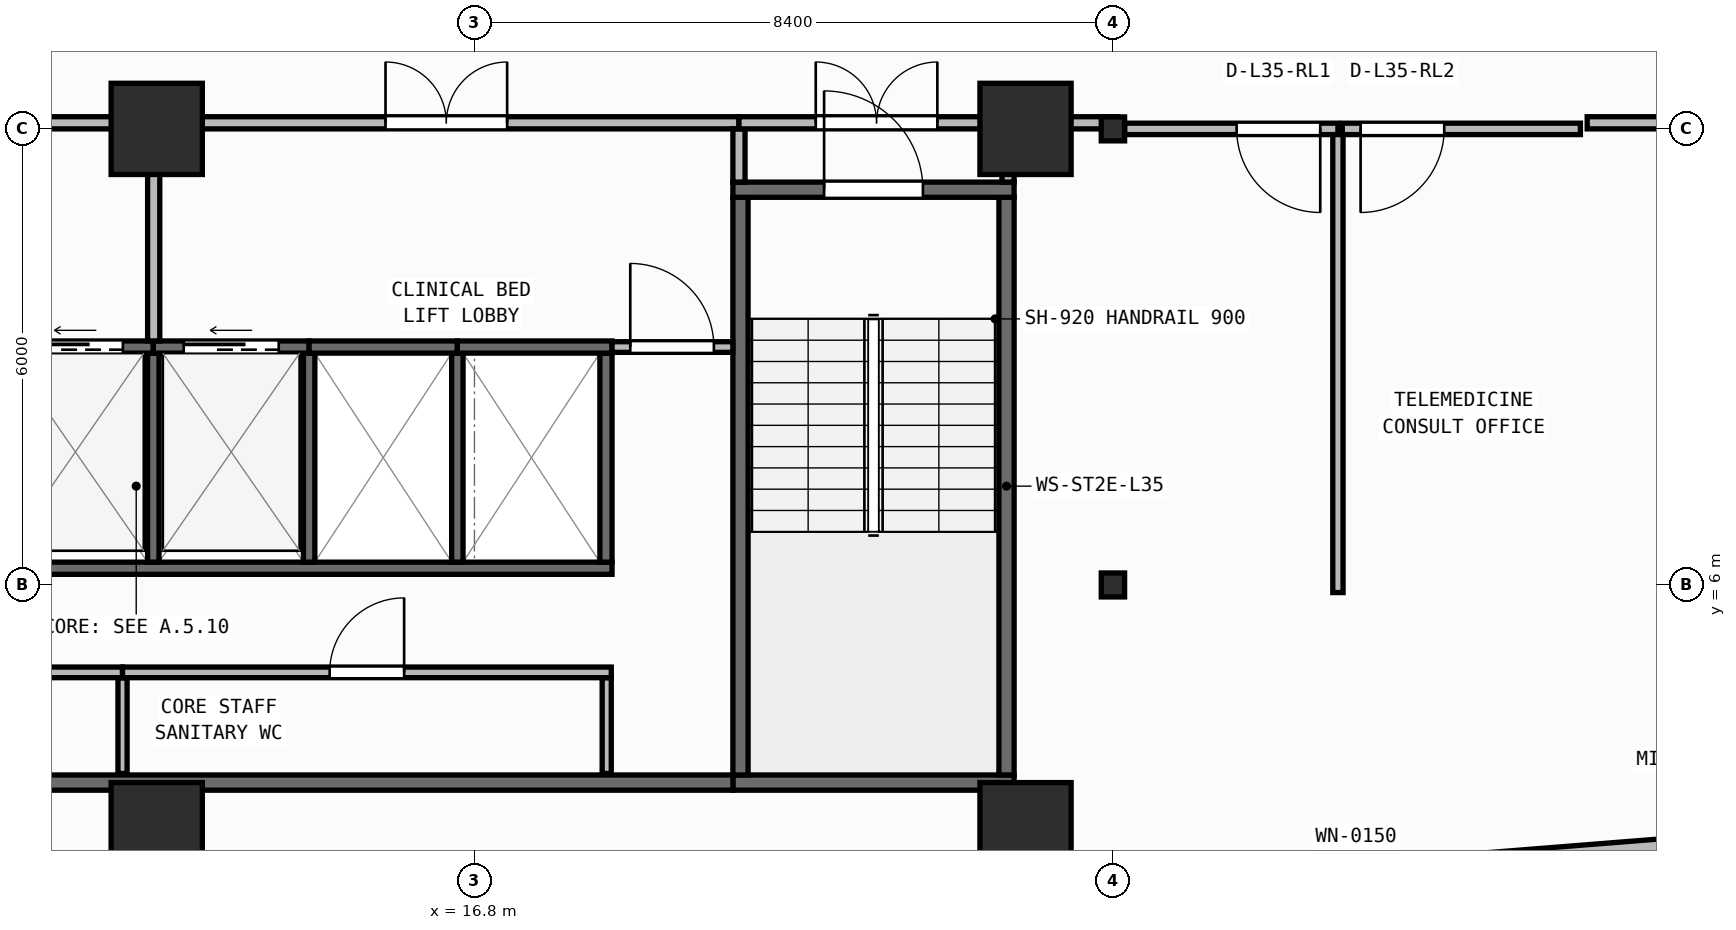
"""IFC4 building model, lengths in metres.
Left out: names, types, materials, properties, quantities, classifications, styles, units other than length and angle.
Written with IfcOpenShell. Run it as: python <this file> out.ifc"""

import sys

from ifc_helpers import new_model, si_unit, direction, frame, frame_2d, origin, origin_2d, place, context, subcontext, project, spatial, rectangle, i_section, extrude, element, fill, save


model = new_model("IFC4")
c1 = context("Model", 3, precision=1e-05, world=origin(), true_north=direction((0.0, 1.0)))
c2 = subcontext(c1, "Body", "Model", "MODEL_VIEW")
j1 = project(units=[si_unit("LENGTHUNIT", "METRE"), si_unit("PLANEANGLEUNIT", "RADIAN")], contexts=[c1])
p1 = place(None, origin())
s1 = spatial("IfcSite", under=j1, at=p1, CompositionType="ELEMENT")
p2 = place(p1, origin())
s2 = spatial("IfcBuilding", under=s1, at=p2, CompositionType="ELEMENT")
p3 = place(p2, frame((0.0, 0.0, 142.85)))
s3 = spatial("IfcBuildingStorey", under=s2, at=p3, CompositionType="ELEMENT", Elevation=142.85)
for number, where, z_axis, x_axis in (
    (1, (12.62, 2.8, 0.0), (0.0, 0.0, 1.0), (1.0, 0.0, 0.0)),
    (2, (24.05, 2.8, 0.0), (0.0, 0.0, 1.0), (1.0, 0.0, 0.0)),
):
    element("IfcColumn", number, at=place(p3, frame(where, z_axis=z_axis, x_axis=x_axis)), inside=s3, PredefinedType="COLUMN", context=c2, shape_type="SweptSolid", body=[
        extrude(rectangle(XDim=1.2, YDim=1.2, at=origin_2d()), origin(), (0.0, 0.0, 1.0), 3.95),
    ])
p4 = place(p3, frame((25.2, 6.0, 0.0), z_axis=(0.0, 0.0, 1.0), x_axis=(1.0, 0.0, 0.0)))
e3 = element("IfcColumn", 3, at=p4, inside=s3, PredefinedType="COLUMN", context=c2, shape_type="SweptSolid", body=[
    extrude(i_section(OverallWidth=0.307, OverallDepth=0.315, WebThickness=0.012, FlangeThickness=0.019, FilletRadius=0.017, at=origin_2d()), origin(), (0.0, 0.0, 1.0), 3.95),
])
for number, where, z_axis, x_axis in (
    (4, (12.62, 12.0, 0.0), (0.0, 0.0, 1.0), (1.0, 0.0, 0.0)),
    (5, (24.05, 12.0, 0.0), (0.0, 0.0, 1.0), (1.0, 0.0, 0.0)),
):
    element("IfcColumn", number, at=place(p3, frame(where, z_axis=z_axis, x_axis=x_axis)), inside=s3, PredefinedType="COLUMN", context=c2, shape_type="SweptSolid", body=[
        extrude(rectangle(XDim=1.2, YDim=1.2, at=origin_2d()), origin(), (0.0, 0.0, 1.0), 3.95),
    ])
p5 = place(p3, frame((25.2, 12.0, 0.0), z_axis=(0.0, 0.0, 1.0), x_axis=(1.0, 0.0, 0.0)))
e6 = element("IfcColumn", 6, at=p5, inside=s3, PredefinedType="COLUMN", context=c2, shape_type="SweptSolid", body=[
    extrude(i_section(OverallWidth=0.307, OverallDepth=0.315, WebThickness=0.012, FlangeThickness=0.019, FilletRadius=0.017, at=origin_2d()), origin(), (0.0, 0.0, 1.0), 3.95),
])
p6 = place(p3, frame((2.76, 0.173, 0.0), z_axis=(0.0, 0.0, 1.0), x_axis=(0.996857931723, 0.079210251617, 0.0)))
e7 = element("IfcWall", 7, at=p6, inside=s3, PredefinedType="STANDARD", context=c2, shape_type="SweptSolid", body=[
    extrude(rectangle(XDim=51.442, YDim=0.26, at=frame_2d((25.721, 0.0))), origin(), (0.0, 0.0, 1.0), 3.71),
])
p7 = place(p6, frame((24.521, 0.0, 0.9)))
e8 = element("IfcOpeningElement", 8, at=p7, cuts=e7, PredefinedType="OPENING", context=c2, shape_type="SweptSolid", body=[
    extrude(rectangle(XDim=2.4, YDim=1.65, at=frame_2d((1.2, 0.825))), frame((0.0, 0.14, 0.0), z_axis=(0.0, -1.0, 0.0), x_axis=(1.0, 0.0, 0.0)), (0.0, 0.0, 1.0), 0.28),
])
p8 = place(p3, frame((20.2, 3.4, 0.0), z_axis=(0.0, 0.0, 1.0), x_axis=(1.0, 0.0, 0.0)))
e9 = element("IfcWall", 9, at=p8, inside=s3, PredefinedType="SHEAR", context=c2, shape_type="SweptSolid", body=[
    extrude(rectangle(XDim=3.7, YDim=0.2, at=frame_2d((1.85, 0.0))), origin(), (0.0, 0.0, 1.0), 3.71),
])
for number, where, z_axis, x_axis in (
    (10, (20.3, 3.5, 0.0), (0.0, 0.0, 1.0), (0.0, 1.0, 0.0)),
    (11, (23.8, 3.5, 0.0), (0.0, 0.0, 1.0), (0.0, 1.0, 0.0)),
):
    element("IfcWall", number, at=place(p3, frame(where, z_axis=z_axis, x_axis=x_axis)), inside=s3, PredefinedType="SHEAR", context=c2, shape_type="SweptSolid", body=[
        extrude(rectangle(XDim=7.6, YDim=0.2, at=frame_2d((3.8, 0.0))), origin(), (0.0, 0.0, 1.0), 3.71),
    ])
p9 = place(p3, frame((20.2, 11.2, 0.0), z_axis=(0.0, 0.0, 1.0), x_axis=(1.0, 0.0, 0.0)))
e12 = element("IfcWall", 12, at=p9, inside=s3, PredefinedType="SHEAR", context=c2, shape_type="SweptSolid", body=[
    extrude(rectangle(XDim=3.7, YDim=0.2, at=frame_2d((1.85, 0.0))), origin(), (0.0, 0.0, 1.0), 3.71),
])
p10 = place(p9, frame((1.2, 0.0, 0.0)))
e13 = element("IfcOpeningElement", 13, at=p10, cuts=e12, PredefinedType="OPENING", context=c2, shape_type="SweptSolid", body=[
    extrude(rectangle(XDim=1.3, YDim=2.15, at=frame_2d((0.65, 1.075))), frame((0.0, 0.11, 0.0), z_axis=(0.0, -1.0, 0.0), x_axis=(1.0, 0.0, 0.0)), (0.0, 0.0, 1.0), 0.22),
])
p11 = place(p3, frame((6.5, 3.4, 0.0), z_axis=(0.0, 0.0, 1.0), x_axis=(1.0, 0.0, 0.0)))
e14 = element("IfcWall", 14, at=p11, inside=s3, PredefinedType="SHEAR", context=c2, shape_type="SweptSolid", body=[
    extrude(rectangle(XDim=13.7, YDim=0.2, at=frame_2d((6.85, 0.0))), origin(), (0.0, 0.0, 1.0), 3.71),
])
p12 = place(p3, frame((6.5, 6.22, 0.0), z_axis=(0.0, 0.0, 1.0), x_axis=(1.0, 0.0, 0.0)))
e15 = element("IfcWall", 15, at=p12, inside=s3, PredefinedType="SHEAR", context=c2, shape_type="SweptSolid", body=[
    extrude(rectangle(XDim=12.11, YDim=0.16, at=frame_2d((6.055, 0.0))), origin(), (0.0, 0.0, 1.0), 3.71),
])
p13 = place(p3, frame((18.53, 6.3, 0.0), z_axis=(0.0, 0.0, 1.0), x_axis=(0.0, 1.0, 0.0)))
e16 = element("IfcWall", 16, at=p13, inside=s3, PredefinedType="SHEAR", context=c2, shape_type="SweptSolid", body=[
    extrude(rectangle(XDim=2.75, YDim=0.16, at=frame_2d((1.375, 0.0))), origin(), (0.0, 0.0, 1.0), 3.71),
])
for number, where, z_axis, x_axis in (
    (17, (12.575, 6.3, 0.0), (0.0, 0.0, 1.0), (0.0, 1.0, 0.0)),
    (18, (14.625, 6.3, 0.0), (0.0, 0.0, 1.0), (0.0, 1.0, 0.0)),
    (19, (16.575, 6.3, 0.0), (0.0, 0.0, 1.0), (0.0, 1.0, 0.0)),
):
    element("IfcWall", number, at=place(p3, frame(where, z_axis=z_axis, x_axis=x_axis)), inside=s3, PredefinedType="SHEAR", context=c2, shape_type="SweptSolid", body=[
        extrude(rectangle(XDim=2.75, YDim=0.15, at=frame_2d((1.375, 0.0))), origin(), (0.0, 0.0, 1.0), 3.71),
    ])
p14 = place(p3, frame((10.525, 9.13, 0.0), z_axis=(0.0, 0.0, 1.0), x_axis=(1.0, 0.0, 0.0)))
e20 = element("IfcWall", 20, at=p14, inside=s3, PredefinedType="SHEAR", context=c2, shape_type="SweptSolid", body=[
    extrude(rectangle(XDim=2.05, YDim=0.16, at=frame_2d((1.025, 0.0))), origin(), (0.0, 0.0, 1.0), 3.71),
])
p15 = place(p14, frame((0.4, 0.0, 0.0)))
e21 = element("IfcOpeningElement", 21, at=p15, cuts=e20, PredefinedType="OPENING", context=c2, shape_type="SweptSolid", body=[
    extrude(rectangle(XDim=1.25, YDim=2.15, at=frame_2d((0.625, 1.075))), frame((0.0, 0.09, 0.0), z_axis=(0.0, -1.0, 0.0), x_axis=(1.0, 0.0, 0.0)), (0.0, 0.0, 1.0), 0.18),
])
p16 = place(p3, frame((12.575, 9.13, 0.0), z_axis=(0.0, 0.0, 1.0), x_axis=(1.0, 0.0, 0.0)))
e22 = element("IfcWall", 22, at=p16, inside=s3, PredefinedType="SHEAR", context=c2, shape_type="SweptSolid", body=[
    extrude(rectangle(XDim=2.05, YDim=0.16, at=frame_2d((1.025, 0.0))), origin(), (0.0, 0.0, 1.0), 3.71),
])
p17 = place(p16, frame((0.4, 0.0, 0.0)))
e23 = element("IfcOpeningElement", 23, at=p17, cuts=e22, PredefinedType="OPENING", context=c2, shape_type="SweptSolid", body=[
    extrude(rectangle(XDim=1.25, YDim=2.15, at=frame_2d((0.625, 1.075))), frame((0.0, 0.09, 0.0), z_axis=(0.0, -1.0, 0.0), x_axis=(1.0, 0.0, 0.0)), (0.0, 0.0, 1.0), 0.18),
])
p18 = place(p3, frame((14.625, 9.13, 0.0), z_axis=(0.0, 0.0, 1.0), x_axis=(1.0, 0.0, 0.0)))
e24 = element("IfcWall", 24, at=p18, inside=s3, PredefinedType="SHEAR", context=c2, shape_type="SweptSolid", body=[
    extrude(rectangle(XDim=1.95, YDim=0.16, at=frame_2d((0.975, 0.0))), origin(), (0.0, 0.0, 1.0), 3.71),
])
p19 = place(p3, frame((16.575, 9.13, 0.0), z_axis=(0.0, 0.0, 1.0), x_axis=(1.0, 0.0, 0.0)))
e25 = element("IfcWall", 25, at=p19, inside=s3, PredefinedType="SHEAR", context=c2, shape_type="SweptSolid", body=[
    extrude(rectangle(XDim=2.035, YDim=0.16, at=frame_2d((1.018, 0.0))), origin(), (0.0, 0.0, 1.0), 3.71),
])
for number, where, z_axis, x_axis in (
    (26, (12.17, 3.52, 0.0), (0.0, 0.0, 1.0), (0.0, 1.0, 0.0)),
    (27, (18.54, 3.52, 0.0), (0.0, 0.0, 1.0), (0.0, 1.0, 0.0)),
):
    element("IfcWall", number, at=place(p3, frame(where, z_axis=z_axis, x_axis=x_axis)), inside=s3, PredefinedType="PARTITIONING", context=c2, shape_type="SweptSolid", body=[
        extrude(rectangle(XDim=1.26, YDim=0.12, at=frame_2d((0.63, 0.0))), origin(), (0.0, 0.0, 1.0), 3.71),
    ])
p20 = place(p3, frame((6.5, 4.85, 0.0), z_axis=(0.0, 0.0, 1.0), x_axis=(1.0, 0.0, 0.0)))
e28 = element("IfcWall", 28, at=p20, inside=s3, PredefinedType="PARTITIONING", context=c2, shape_type="SweptSolid", body=[
    extrude(rectangle(XDim=5.67, YDim=0.14, at=frame_2d((2.835, 0.0))), origin(), (0.0, 0.0, 1.0), 3.71),
])
p21 = place(p20, frame((2.285, 0.0, 0.0)))
e29 = element("IfcOpeningElement", 29, at=p21, cuts=e28, PredefinedType="OPENING", context=c2, shape_type="SweptSolid", body=[
    extrude(rectangle(XDim=1.1, YDim=2.1, at=frame_2d((0.55, 1.05))), frame((0.0, 0.08, 0.0), z_axis=(0.0, -1.0, 0.0), x_axis=(1.0, 0.0, 0.0)), (0.0, 0.0, 1.0), 0.16),
])
p22 = place(p3, frame((12.17, 4.85, 0.0), z_axis=(0.0, 0.0, 1.0), x_axis=(1.0, 0.0, 0.0)))
e30 = element("IfcWall", 30, at=p22, inside=s3, PredefinedType="PARTITIONING", context=c2, shape_type="SweptSolid", body=[
    extrude(rectangle(XDim=6.43, YDim=0.14, at=frame_2d((3.215, 0.0))), origin(), (0.0, 0.0, 1.0), 3.71),
])
p23 = place(p22, frame((2.725, 0.0, 0.0)))
e31 = element("IfcOpeningElement", 31, at=p23, cuts=e30, PredefinedType="OPENING", context=c2, shape_type="SweptSolid", body=[
    extrude(rectangle(XDim=0.98, YDim=2.1, at=frame_2d((0.49, 1.05))), frame((0.0, 0.08, 0.0), z_axis=(0.0, -1.0, 0.0), x_axis=(1.0, 0.0, 0.0)), (0.0, 0.0, 1.0), 0.16),
])
p24 = place(p3, frame((18.61, 9.13, 0.0), z_axis=(0.0, 0.0, 1.0), x_axis=(1.0, 0.0, 0.0)))
e32 = element("IfcWall", 32, at=p24, inside=s3, PredefinedType="PARTITIONING", context=c2, shape_type="SweptSolid", body=[
    extrude(rectangle(XDim=1.59, YDim=0.14, at=frame_2d((0.795, 0.0))), origin(), (0.0, 0.0, 1.0), 3.71),
])
p25 = place(p24, frame((0.24, 0.0, 0.0)))
e33 = element("IfcOpeningElement", 33, at=p25, cuts=e32, PredefinedType="OPENING", context=c2, shape_type="SweptSolid", body=[
    extrude(rectangle(XDim=1.1, YDim=2.1, at=frame_2d((0.55, 1.05))), frame((0.0, 0.08, 0.0), z_axis=(0.0, -1.0, 0.0), x_axis=(1.0, 0.0, 0.0)), (0.0, 0.0, 1.0), 0.16),
])
p26 = place(p3, frame((6.4, 12.08, 0.0), z_axis=(0.0, 0.0, 1.0), x_axis=(1.0, 0.0, 0.0)))
e34 = element("IfcWall", 34, at=p26, inside=s3, PredefinedType="PARTITIONING", context=c2, shape_type="SweptSolid", body=[
    extrude(rectangle(XDim=6.18, YDim=0.16, at=frame_2d((3.09, 0.0))), origin(), (0.0, 0.0, 1.0), 3.083),
])
p27 = place(p26, frame((2.29, 0.0, 0.0)))
e35 = element("IfcOpeningElement", 35, at=p27, cuts=e34, PredefinedType="OPENING", context=c2, shape_type="SweptSolid", body=[
    extrude(rectangle(XDim=1.6, YDim=2.05, at=frame_2d((0.8, 1.025))), frame((0.0, 0.09, 0.0), z_axis=(0.0, -1.0, 0.0), x_axis=(1.0, 0.0, 0.0)), (0.0, 0.0, 1.0), 0.18),
])
p28 = place(p3, frame((12.58, 9.21, 0.0), z_axis=(0.0, 0.0, 1.0), x_axis=(0.0, 1.0, 0.0)))
e36 = element("IfcWall", 36, at=p28, inside=s3, PredefinedType="PARTITIONING", context=c2, shape_type="SweptSolid", body=[
    extrude(rectangle(XDim=2.79, YDim=0.16, at=frame_2d((1.395, 0.0))), origin(), (0.0, 0.0, 1.0), 3.71),
])
p29 = place(p3, frame((12.58, 12.08, 0.0), z_axis=(0.0, 0.0, 1.0), x_axis=(1.0, 0.0, 0.0)))
e37 = element("IfcWall", 37, at=p29, inside=s3, PredefinedType="PARTITIONING", context=c2, shape_type="SweptSolid", body=[
    extrude(rectangle(XDim=7.7, YDim=0.16, at=frame_2d((3.85, 0.0))), origin(), (0.0, 0.0, 1.0), 3.083),
])
p30 = place(p29, frame((3.05, 0.0, 0.0)))
e38 = element("IfcOpeningElement", 38, at=p30, cuts=e37, PredefinedType="OPENING", context=c2, shape_type="SweptSolid", body=[
    extrude(rectangle(XDim=1.6, YDim=2.05, at=frame_2d((0.8, 1.025))), frame((0.0, 0.09, 0.0), z_axis=(0.0, -1.0, 0.0), x_axis=(1.0, 0.0, 0.0)), (0.0, 0.0, 1.0), 0.18),
])
p31 = place(p3, frame((20.28, 11.3, 0.0), z_axis=(0.0, 0.0, 1.0), x_axis=(0.0, 1.0, 0.0)))
e39 = element("IfcWall", 39, at=p31, inside=s3, PredefinedType="PARTITIONING", context=c2, shape_type="SweptSolid", body=[
    extrude(rectangle(XDim=0.7, YDim=0.16, at=frame_2d((0.35, 0.0))), origin(), (0.0, 0.0, 1.0), 3.71),
])
p32 = place(p3, frame((20.28, 12.08, 0.0), z_axis=(0.0, 0.0, 1.0), x_axis=(1.0, 0.0, 0.0)))
e40 = element("IfcWall", 40, at=p32, inside=s3, PredefinedType="PARTITIONING", context=c2, shape_type="SweptSolid", body=[
    extrude(rectangle(XDim=3.62, YDim=0.16, at=frame_2d((1.81, 0.0))), origin(), (0.0, 0.0, 1.0), 3.083),
])
p33 = place(p32, frame((1.01, 0.0, 0.0)))
e41 = element("IfcOpeningElement", 41, at=p33, cuts=e40, PredefinedType="OPENING", context=c2, shape_type="SweptSolid", body=[
    extrude(rectangle(XDim=1.6, YDim=2.05, at=frame_2d((0.8, 1.025))), frame((0.0, 0.09, 0.0), z_axis=(0.0, -1.0, 0.0), x_axis=(1.0, 0.0, 0.0)), (0.0, 0.0, 1.0), 0.18),
])
p34 = place(p3, frame((23.82, 11.3, 0.0), z_axis=(0.0, 0.0, 1.0), x_axis=(0.0, 1.0, 0.0)))
e42 = element("IfcWall", 42, at=p34, inside=s3, PredefinedType="PARTITIONING", context=c2, shape_type="SweptSolid", body=[
    extrude(rectangle(XDim=0.7, YDim=0.16, at=frame_2d((0.35, 0.0))), origin(), (0.0, 0.0, 1.0), 3.71),
])
p35 = place(p3, frame((28.16, 5.9, 0.0), z_axis=(0.0, 0.0, 1.0), x_axis=(0.0, 1.0, 0.0)))
e43 = element("IfcWall", 43, at=p35, inside=s3, PredefinedType="PARTITIONING", context=c2, shape_type="SweptSolid", body=[
    extrude(rectangle(XDim=6.1, YDim=0.135, at=frame_2d((3.05, 0.0))), origin(), (0.0, 0.0, 1.0), 3.71),
])
p36 = place(p3, frame((28.16, 12.0, 0.0), z_axis=(0.0, 0.0, 1.0), x_axis=(-1.0, 0.0, 0.0)))
e44 = element("IfcWall", 44, at=p36, inside=s3, PredefinedType="PARTITIONING", context=c2, shape_type="SweptSolid", body=[
    extrude(rectangle(XDim=2.806, YDim=0.15, at=frame_2d((1.403, 0.0))), origin(), (0.0, 0.0, 1.0), 3.083),
])
p37 = place(p36, frame((0.233, 0.0, 0.0)))
e45 = element("IfcOpeningElement", 45, at=p37, cuts=e44, PredefinedType="OPENING", context=c2, shape_type="SweptSolid", body=[
    extrude(rectangle(XDim=1.1, YDim=2.1, at=frame_2d((0.55, 1.05))), frame((0.0, 0.085, 0.0), z_axis=(0.0, -1.0, 0.0), x_axis=(1.0, 0.0, 0.0)), (0.0, 0.0, 1.0), 0.17),
])
p38 = place(p3, frame((31.35, 12.0, 0.0), z_axis=(0.0, 0.0, 1.0), x_axis=(-1.0, 0.0, 0.0)))
e46 = element("IfcWall", 46, at=p38, inside=s3, PredefinedType="PARTITIONING", context=c2, shape_type="SweptSolid", body=[
    extrude(rectangle(XDim=3.133, YDim=0.15, at=frame_2d((1.566, 0.0))), origin(), (0.0, 0.0, 1.0), 3.083),
])
p39 = place(p38, frame((1.792, 0.0, 0.0)))
e47 = element("IfcOpeningElement", 47, at=p39, cuts=e46, PredefinedType="OPENING", context=c2, shape_type="SweptSolid", body=[
    extrude(rectangle(XDim=1.1, YDim=2.1, at=frame_2d((0.55, 1.05))), frame((0.0, 0.085, 0.0), z_axis=(0.0, -1.0, 0.0), x_axis=(1.0, 0.0, 0.0)), (0.0, 0.0, 1.0), 0.17),
])
p40 = place(p3, frame((24.02, 12.08, 0.0), z_axis=(0.0, 0.0, 1.0), x_axis=(1.0, 0.0, 0.0)))
e48 = element("IfcWall", 48, at=p40, inside=s3, PredefinedType="PARTITIONING", context=c2, shape_type="SweptSolid", body=[
    extrude(rectangle(XDim=1.244, YDim=0.16, at=frame_2d((0.622, 0.0))), origin(), (0.0, 0.0, 1.0), 3.083),
])
p41 = place(p3, frame((31.439, 12.08, 0.0), z_axis=(0.0, 0.0, 1.0), x_axis=(1.0, 0.0, 0.0)))
e49 = element("IfcWall", 49, at=p41, inside=s3, PredefinedType="PARTITIONING", context=c2, shape_type="SweptSolid", body=[
    extrude(rectangle(XDim=2.631, YDim=0.16, at=frame_2d((1.315, 0.0))), origin(), (0.0, 0.0, 1.0), 3.083),
])
p42 = place(p10, origin())
e50 = element("IfcDoor", 50, at=p42, inside=s3, OperationType="SINGLE_SWING_LEFT", PredefinedType="DOOR", context=c2, shape_type="SweptSolid", body=[
    extrude(rectangle(XDim=1.3, YDim=2.15, at=frame_2d((0.65, 1.075))), frame((0.0, 0.025, 0.0), z_axis=(0.0, -1.0, 0.0), x_axis=(1.0, 0.0, 0.0)), (0.0, 0.0, 1.0), 0.05),
])
fill(e13, e50)
p43 = place(p15, origin())
e51 = element("IfcDoor", 51, at=p43, inside=s3, OperationType="SLIDING_TO_LEFT", PredefinedType="DOOR", context=c2, shape_type="SweptSolid", body=[
    extrude(rectangle(XDim=1.25, YDim=2.15, at=frame_2d((0.625, 1.075))), frame((0.0, 0.025, 0.0), z_axis=(0.0, -1.0, 0.0), x_axis=(1.0, 0.0, 0.0)), (0.0, 0.0, 1.0), 0.05),
])
fill(e21, e51)
p44 = place(p17, origin())
e52 = element("IfcDoor", 52, at=p44, inside=s3, OperationType="SLIDING_TO_LEFT", PredefinedType="DOOR", context=c2, shape_type="SweptSolid", body=[
    extrude(rectangle(XDim=1.25, YDim=2.15, at=frame_2d((0.625, 1.075))), frame((0.0, 0.025, 0.0), z_axis=(0.0, -1.0, 0.0), x_axis=(1.0, 0.0, 0.0)), (0.0, 0.0, 1.0), 0.05),
])
fill(e23, e52)
p45 = place(p23, origin())
e53 = element("IfcDoor", 53, at=p45, inside=s3, OperationType="SINGLE_SWING_RIGHT", PredefinedType="DOOR", context=c2, shape_type="SweptSolid", body=[
    extrude(rectangle(XDim=0.98, YDim=2.1, at=frame_2d((0.49, 1.05))), frame((0.0, 0.025, 0.0), z_axis=(0.0, -1.0, 0.0), x_axis=(1.0, 0.0, 0.0)), (0.0, 0.0, 1.0), 0.05),
])
fill(e31, e53)
p46 = place(p25, origin())
e54 = element("IfcDoor", 54, at=p46, inside=s3, OperationType="SINGLE_SWING_LEFT", PredefinedType="DOOR", context=c2, shape_type="SweptSolid", body=[
    extrude(rectangle(XDim=1.1, YDim=2.1, at=frame_2d((0.55, 1.05))), frame((0.0, 0.025, 0.0), z_axis=(0.0, -1.0, 0.0), x_axis=(1.0, 0.0, 0.0)), (0.0, 0.0, 1.0), 0.05),
])
fill(e33, e54)
p47 = place(p30, origin())
e55 = element("IfcDoor", 55, at=p47, inside=s3, OperationType="DOUBLE_DOOR_SINGLE_SWING", PredefinedType="DOOR", context=c2, shape_type="SweptSolid", body=[
    extrude(rectangle(XDim=1.6, YDim=2.05, at=frame_2d((0.8, 1.025))), frame((0.0, 0.025, 0.0), z_axis=(0.0, -1.0, 0.0), x_axis=(1.0, 0.0, 0.0)), (0.0, 0.0, 1.0), 0.05),
])
fill(e38, e55)
p48 = place(p33, origin())
e56 = element("IfcDoor", 56, at=p48, inside=s3, OperationType="DOUBLE_DOOR_SINGLE_SWING", PredefinedType="DOOR", context=c2, shape_type="SweptSolid", body=[
    extrude(rectangle(XDim=1.6, YDim=2.05, at=frame_2d((0.8, 1.025))), frame((0.0, 0.025, 0.0), z_axis=(0.0, -1.0, 0.0), x_axis=(1.0, 0.0, 0.0)), (0.0, 0.0, 1.0), 0.05),
])
fill(e41, e56)
p49 = place(p37, origin())
e57 = element("IfcDoor", 57, at=p49, inside=s3, OperationType="SINGLE_SWING_LEFT", PredefinedType="DOOR", context=c2, shape_type="SweptSolid", body=[
    extrude(rectangle(XDim=1.1, YDim=2.1, at=frame_2d((0.55, 1.05))), frame((0.0, 0.025, 0.0), z_axis=(0.0, -1.0, 0.0), x_axis=(1.0, 0.0, 0.0)), (0.0, 0.0, 1.0), 0.05),
])
fill(e45, e57)
p50 = place(p39, origin())
e58 = element("IfcDoor", 58, at=p50, inside=s3, OperationType="SINGLE_SWING_RIGHT", PredefinedType="DOOR", context=c2, shape_type="SweptSolid", body=[
    extrude(rectangle(XDim=1.1, YDim=2.1, at=frame_2d((0.55, 1.05))), frame((0.0, 0.025, 0.0), z_axis=(0.0, -1.0, 0.0), x_axis=(1.0, 0.0, 0.0)), (0.0, 0.0, 1.0), 0.05),
])
fill(e47, e58)
save(model, sys.argv[1])
